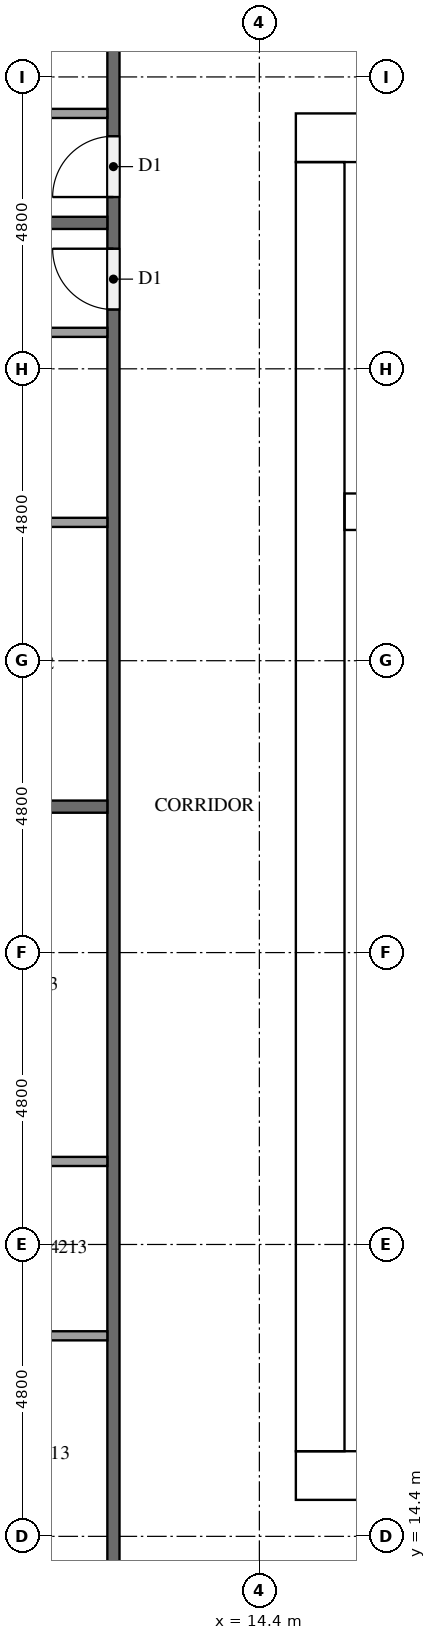
"""IFC4 building model, lengths in metres.
Left out: names, types, materials, properties, quantities, classifications, styles, units other than length and angle.
Written with IfcOpenShell. Run it as: python <this file> out.ifc"""

import sys

from ifc_helpers import new_model, si_unit, direction, frame, frame_2d, origin, place, context, subcontext, project, spatial, rectangle, extrude, element, fill, save


model = new_model("IFC4")
c1 = context("Model", 3, precision=1e-05, world=origin(), true_north=direction((0.0, 1.0)))
c2 = subcontext(c1, "Body", "Model", "MODEL_VIEW")
j1 = project(units=[si_unit("LENGTHUNIT", "METRE"), si_unit("PLANEANGLEUNIT", "RADIAN")], contexts=[c1])
p1 = place(None, origin())
s1 = spatial("IfcSite", under=j1, at=p1, CompositionType="ELEMENT")
p2 = place(p1, origin())
s2 = spatial("IfcBuilding", under=s1, at=p2, CompositionType="ELEMENT")
p3 = place(p2, frame((0.0, 0.0, 163.0)))
s3 = spatial("IfcBuildingStorey", under=s2, at=p3, CompositionType="ELEMENT", Elevation=163.0)
p4 = place(p3, frame((15.0, 15.4, 0.0), z_axis=(0.0, 0.0, 1.0), x_axis=(1.0, 0.0, 0.0)))
e1 = element("IfcWall", 1, at=p4, inside=s3, PredefinedType="SHEAR", context=c2, shape_type="SweptSolid", body=[
    extrude(rectangle(XDim=32.4, YDim=0.8, at=frame_2d((16.2, 0.0))), origin(), (0.0, 0.0, 1.0), 3.2),
])
p5 = place(p4, frame((15.3, 0.0, 0.0)))
e2 = element("IfcOpeningElement", 2, at=p5, cuts=e1, PredefinedType="OPENING", context=c2, shape_type="SweptSolid", body=[
    extrude(rectangle(XDim=1.8, YDim=2.1, at=frame_2d((0.9, 1.05))), frame((0.0, 0.41, 0.0), z_axis=(0.0, -1.0, 0.0), x_axis=(1.0, 0.0, 0.0)), (0.0, 0.0, 1.0), 0.82),
])
p6 = place(p3, frame((15.0, 37.4, 0.0), z_axis=(0.0, 0.0, 1.0), x_axis=(1.0, 0.0, 0.0)))
e3 = element("IfcWall", 3, at=p6, inside=s3, PredefinedType="SHEAR", context=c2, shape_type="SweptSolid", body=[
    extrude(rectangle(XDim=32.4, YDim=0.8, at=frame_2d((16.2, 0.0))), origin(), (0.0, 0.0, 1.0), 3.2),
])
p7 = place(p6, frame((15.3, 0.0, 0.0)))
e4 = element("IfcOpeningElement", 4, at=p7, cuts=e3, PredefinedType="OPENING", context=c2, shape_type="SweptSolid", body=[
    extrude(rectangle(XDim=1.8, YDim=2.1, at=frame_2d((0.9, 1.05))), frame((0.0, 0.41, 0.0), z_axis=(0.0, -1.0, 0.0), x_axis=(1.0, 0.0, 0.0)), (0.0, 0.0, 1.0), 0.82),
])
p8 = place(p6, frame((1.51, 0.0, 0.0)))
e5 = element("IfcOpeningElement", 5, at=p8, cuts=e3, PredefinedType="OPENING", context=c2, shape_type="SweptSolid", body=[
    extrude(rectangle(XDim=1.0, YDim=2.1, at=frame_2d((0.5, 1.05))), frame((0.0, 0.41, 0.0), z_axis=(0.0, -1.0, 0.0), x_axis=(1.0, 0.0, 0.0)), (0.0, 0.0, 1.0), 0.82),
])
p9 = place(p6, frame((5.11, 0.0, 0.0)))
e6 = element("IfcOpeningElement", 6, at=p9, cuts=e3, PredefinedType="OPENING", context=c2, shape_type="SweptSolid", body=[
    extrude(rectangle(XDim=1.0, YDim=2.1, at=frame_2d((0.5, 1.05))), frame((0.0, 0.41, 0.0), z_axis=(0.0, -1.0, 0.0), x_axis=(1.0, 0.0, 0.0)), (0.0, 0.0, 1.0), 0.82),
])
p10 = place(p3, frame((15.4, 15.8, 0.0), z_axis=(0.0, 0.0, 1.0), x_axis=(0.0, 1.0, 0.0)))
e7 = element("IfcWall", 7, at=p10, inside=s3, PredefinedType="SHEAR", context=c2, shape_type="SweptSolid", body=[
    extrude(rectangle(XDim=21.2, YDim=0.8, at=frame_2d((10.6, 0.0))), origin(), (0.0, 0.0, 1.0), 3.2),
])
p11 = place(p10, frame((4.96, 0.0, 0.0)))
e8 = element("IfcOpeningElement", 8, at=p11, cuts=e7, PredefinedType="OPENING", context=c2, shape_type="SweptSolid", body=[
    extrude(rectangle(XDim=1.2, YDim=2.1, at=frame_2d((0.6, 1.05))), frame((0.0, 0.41, 0.0), z_axis=(0.0, -1.0, 0.0), x_axis=(1.0, 0.0, 0.0)), (0.0, 0.0, 1.0), 0.82),
])
p12 = place(p3, frame((15.8, 31.25, 0.0), z_axis=(0.0, 0.0, 1.0), x_axis=(1.0, 0.0, 0.0)))
e9 = element("IfcWall", 9, at=p12, inside=s3, PredefinedType="SHEAR", context=c2, shape_type="SweptSolid", body=[
    extrude(rectangle(XDim=7.0, YDim=0.6, at=frame_2d((3.5, 0.0))), origin(), (0.0, 0.0, 1.0), 3.2),
])
p13 = place(p3, frame((12.0, 12.1, 0.0), z_axis=(0.0, 0.0, 1.0), x_axis=(0.0, 1.0, 0.0)))
e10 = element("IfcWall", 10, at=p13, inside=s3, PredefinedType="PARTITIONING", context=c2, shape_type="SweptSolid", body=[
    extrude(rectangle(XDim=28.6, YDim=0.2, at=frame_2d((14.3, 0.0))), origin(), (0.0, 0.0, 1.0), 3.2),
])
p14 = place(p13, frame((24.325, 0.0, 0.0)))
e11 = element("IfcOpeningElement", 11, at=p14, cuts=e10, PredefinedType="OPENING", context=c2, shape_type="SweptSolid", body=[
    extrude(rectangle(XDim=1.0, YDim=2.1, at=frame_2d((0.5, 1.05))), frame((0.0, 0.11, 0.0), z_axis=(0.0, -1.0, 0.0), x_axis=(1.0, 0.0, 0.0)), (0.0, 0.0, 1.0), 0.22),
])
p15 = place(p13, frame((22.475, 0.0, 0.0)))
e12 = element("IfcOpeningElement", 12, at=p15, cuts=e10, PredefinedType="OPENING", context=c2, shape_type="SweptSolid", body=[
    extrude(rectangle(XDim=1.0, YDim=2.1, at=frame_2d((0.5, 1.05))), frame((0.0, 0.11, 0.0), z_axis=(0.0, -1.0, 0.0), x_axis=(1.0, 0.0, 0.0)), (0.0, 0.0, 1.0), 0.22),
])
p16 = place(p13, frame((0.325, 0.0, 0.0)))
e13 = element("IfcOpeningElement", 13, at=p16, cuts=e10, PredefinedType="OPENING", context=c2, shape_type="SweptSolid", body=[
    extrude(rectangle(XDim=1.0, YDim=2.1, at=frame_2d((0.5, 1.05))), frame((0.0, 0.11, 0.0), z_axis=(0.0, -1.0, 0.0), x_axis=(1.0, 0.0, 0.0)), (0.0, 0.0, 1.0), 0.22),
])
for number, where, z_axis, x_axis in (
    (14, (0.1, 36.0, 0.0), (0.0, 0.0, 1.0), (1.0, 0.0, 0.0)),
    (15, (0.1, 26.4, 0.0), (0.0, 0.0, 1.0), (1.0, 0.0, 0.0)),
):
    element("IfcWall", number, at=place(p3, frame(where, z_axis=z_axis, x_axis=x_axis)), inside=s3, PredefinedType="PARTITIONING", context=c2, shape_type="SweptSolid", body=[
        extrude(rectangle(XDim=11.8, YDim=0.2, at=frame_2d((5.9, 0.0))), origin(), (0.0, 0.0, 1.0), 3.2),
    ])
p17 = place(p3, frame((11.9, 37.8, 0.0), z_axis=(0.0, 0.0, 1.0), x_axis=(-1.0, 0.0, 0.0)))
e16 = element("IfcWall", 16, at=p17, inside=s3, PredefinedType="PARTITIONING", context=c2, shape_type="SweptSolid", body=[
    extrude(rectangle(XDim=3.125, YDim=0.15, at=frame_2d((1.562, 0.0))), origin(), (0.0, 0.0, 1.0), 3.2),
])
p18 = place(p3, frame((11.9, 31.075, 0.0), z_axis=(0.0, 0.0, 1.0), x_axis=(-1.0, 0.0, 0.0)))
e17 = element("IfcWall", 17, at=p18, inside=s3, PredefinedType="PARTITIONING", context=c2, shape_type="SweptSolid", body=[
    extrude(rectangle(XDim=3.875, YDim=0.15, at=frame_2d((1.938, 0.0))), origin(), (0.0, 0.0, 1.0), 3.2),
])
p19 = place(p3, frame((11.9, 34.2, 0.0), z_axis=(0.0, 0.0, 1.0), x_axis=(-1.0, 0.0, 0.0)))
e18 = element("IfcWall", 18, at=p19, inside=s3, PredefinedType="PARTITIONING", context=c2, shape_type="SweptSolid", body=[
    extrude(rectangle(XDim=4.025, YDim=0.15, at=frame_2d((2.012, 0.0))), origin(), (0.0, 0.0, 1.0), 3.2),
])
for number, where, z_axis, x_axis in (
    (19, (11.9, 17.698, 0.0), (0.0, 0.0, 1.0), (-1.0, 0.0, 0.0)),
    (20, (11.9, 20.565, 0.0), (0.0, 0.0, 1.0), (-1.0, 0.0, 0.0)),
):
    element("IfcWall", number, at=place(p3, frame(where, z_axis=z_axis, x_axis=x_axis)), inside=s3, PredefinedType="PARTITIONING", context=c2, shape_type="SweptSolid", body=[
        extrude(rectangle(XDim=3.725, YDim=0.15, at=frame_2d((1.862, 0.0))), origin(), (0.0, 0.0, 1.0), 3.2),
    ])
p20 = place(p11, frame((1.2, 0.0, 0.0), z_axis=(0.0, 0.0, 1.0), x_axis=(-1.0, 0.0, 0.0)))
e21 = element("IfcDoor", 21, at=p20, inside=s3, OperationType="SINGLE_SWING_LEFT", PredefinedType="DOOR", context=c2, shape_type="SweptSolid", body=[
    extrude(rectangle(XDim=1.2, YDim=2.1, at=frame_2d((0.6, 1.05))), frame((0.0, 0.025, 0.0), z_axis=(0.0, -1.0, 0.0), x_axis=(1.0, 0.0, 0.0)), (0.0, 0.0, 1.0), 0.05),
])
fill(e8, e21)
p21 = place(p14, origin())
e22 = element("IfcDoor", 22, at=p21, inside=s3, OperationType="SINGLE_SWING_LEFT", PredefinedType="DOOR", context=c2, shape_type="SweptSolid", body=[
    extrude(rectangle(XDim=1.0, YDim=2.1, at=frame_2d((0.5, 1.05))), frame((0.0, 0.025, 0.0), z_axis=(0.0, -1.0, 0.0), x_axis=(1.0, 0.0, 0.0)), (0.0, 0.0, 1.0), 0.05),
])
fill(e11, e22)
p22 = place(p15, origin())
e23 = element("IfcDoor", 23, at=p22, inside=s3, OperationType="SINGLE_SWING_RIGHT", PredefinedType="DOOR", context=c2, shape_type="SweptSolid", body=[
    extrude(rectangle(XDim=1.0, YDim=2.1, at=frame_2d((0.5, 1.05))), frame((0.0, 0.025, 0.0), z_axis=(0.0, -1.0, 0.0), x_axis=(1.0, 0.0, 0.0)), (0.0, 0.0, 1.0), 0.05),
])
fill(e12, e23)
save(model, sys.argv[1])
